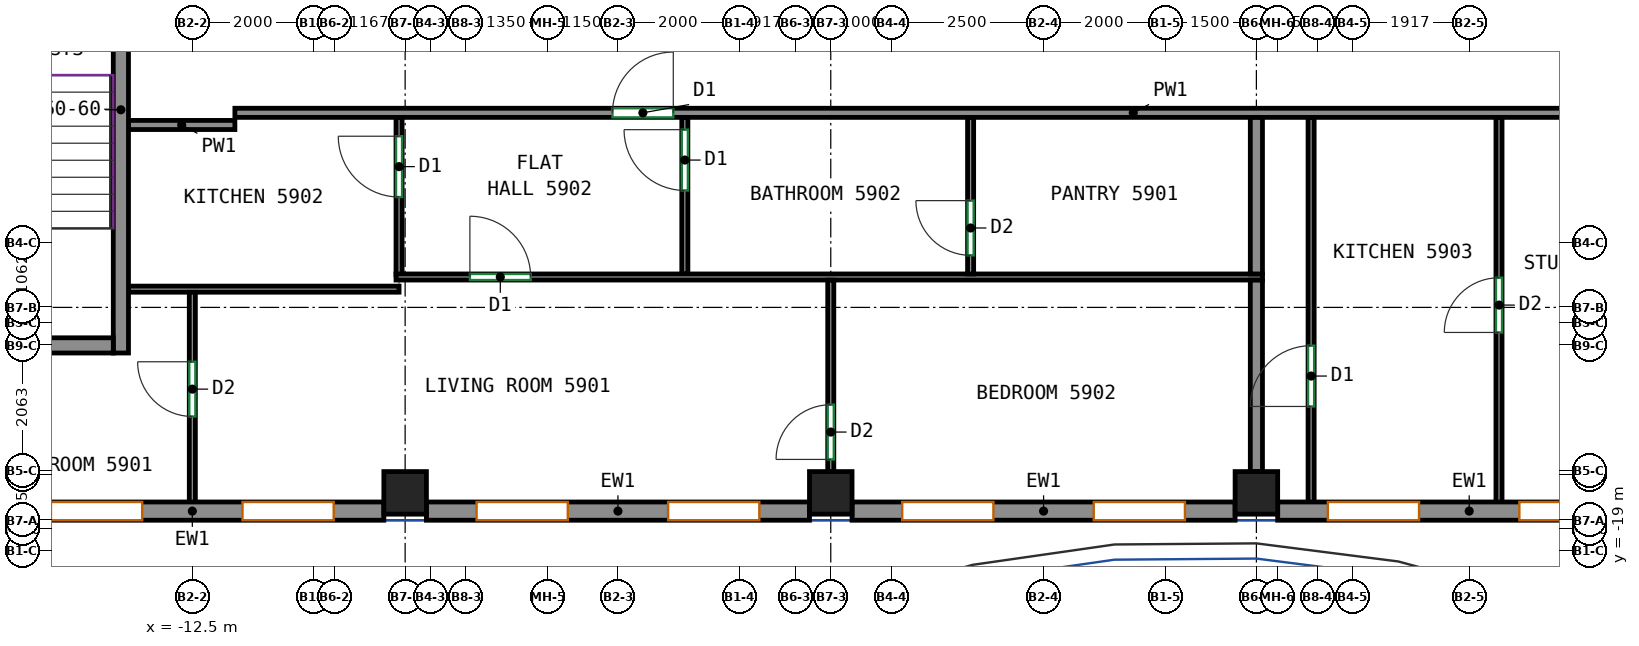
"""IFC4 building model, lengths in metres.
Left out: names, types, materials, properties, quantities, classifications, styles, units other than length and angle.
Written with IfcOpenShell. Run it as: python <this file> out.ifc"""

import sys

from ifc_helpers import new_model, si_unit, direction, frame, frame_2d, origin, origin_2d, place, context, subcontext, project, spatial, rectangle, extrude, source, transform, mapped, element, fill, save


model = new_model("IFC4")
c1 = context("Model", 3, precision=1e-05, world=origin(), true_north=direction((0.0, 1.0)))
c2 = subcontext(c1, "Body", "Model", "MODEL_VIEW")
j1 = project(units=[si_unit("LENGTHUNIT", "METRE"), si_unit("PLANEANGLEUNIT", "RADIAN")], contexts=[c1])
p1 = place(None, origin())
s1 = spatial("IfcSite", under=j1, at=p1, CompositionType="ELEMENT")
p2 = place(p1, origin())
s2 = spatial("IfcBuilding", under=s1, at=p2, CompositionType="ELEMENT")
p3 = place(p2, frame((0.0, 0.0, 245.8)))
s3 = spatial("IfcBuildingStorey", under=s2, at=p3, CompositionType="ELEMENT", Elevation=245.8)
m1 = source(origin(), c2, "Body", "SweptSolid", [
    extrude(rectangle(XDim=0.7, YDim=0.7, at=origin_2d()), origin(), (0.0, 0.0, 1.0), 3.12),
])
for number, where, z_axis, x_axis in (
    (1, (-9.0, -18.05, 0.0), (0.0, 0.0, 1.0), (1.0, 0.0, 0.0)),
    (2, (-2.0, -18.05, 0.0), (0.0, 0.0, 1.0), (1.0, 0.0, 0.0)),
    (3, (5.0, -18.05, 0.0), (0.0, 0.0, 1.0), (1.0, 0.0, 0.0)),
):
    element("IfcColumn", number, at=place(p3, frame(where, z_axis=z_axis, x_axis=x_axis)), inside=s3, PredefinedType="COLUMN", context=c2, shape_type="MappedRepresentation", body=[
        mapped(m1, transform((0.0, 0.0, 0.0))),
    ])
m2 = source(origin(), c2, "Body", "SweptSolid", [
    extrude(rectangle(XDim=8.0, YDim=0.25, at=frame_2d((4.0, 0.0))), origin(), (0.0, 0.0, 1.0), 3.12),
])
p4 = place(p3, frame((-13.675, -15.75, 0.0), z_axis=(0.0, 0.0, 1.0), x_axis=(0.0, 1.0, 0.0)))
e4 = element("IfcWall", 4, at=p4, inside=s3, PredefinedType="SHEAR", context=c2, shape_type="MappedRepresentation", body=[
    mapped(m2, transform((0.0, 0.0, 0.0))),
])
m3 = source(origin(), c2, "Body", "SweptSolid", [
    extrude(rectangle(XDim=3.7, YDim=0.25, at=frame_2d((1.85, 0.0))), origin(), (0.0, 0.0, 1.0), 3.12),
])
p5 = place(p3, frame((-17.5, -15.625, 0.0), z_axis=(0.0, 0.0, 1.0), x_axis=(1.0, 0.0, 0.0)))
e5 = element("IfcWall", 5, at=p5, inside=s3, PredefinedType="SHEAR", context=c2, shape_type="MappedRepresentation", body=[
    mapped(m3, transform((0.0, 0.0, 0.0))),
])
p6 = place(p5, frame((1.25, 0.0, 0.0)))
e6 = element("IfcOpeningElement", 6, at=p6, cuts=e5, PredefinedType="OPENING", context=c2, shape_type="SweptSolid", body=[
    extrude(rectangle(XDim=1.2, YDim=2.1, at=frame_2d((0.6, 1.05))), frame((0.0, 0.135, 0.0), z_axis=(0.0, -1.0, 0.0), x_axis=(1.0, 0.0, 0.0)), (0.0, 0.0, 1.0), 0.27),
])
m4 = source(origin(), c2, "Body", "SweptSolid", [
    extrude(rectangle(XDim=6.3, YDim=0.3, at=frame_2d((3.15, 0.0))), origin(), (0.0, 0.0, 1.0), 3.12),
])
p7 = place(p3, frame((-15.65, -18.35, 0.0), z_axis=(0.0, 0.0, 1.0), x_axis=(1.0, 0.0, 0.0)))
e7 = element("IfcWall", 7, at=p7, inside=s3, PredefinedType="SOLIDWALL", context=c2, shape_type="MappedRepresentation", body=[
    mapped(m4, transform((0.0, 0.0, 0.0))),
])
p8 = place(p7, frame((0.825, 0.0, 0.8)))
e8 = element("IfcOpeningElement", 8, at=p8, cuts=e7, PredefinedType="OPENING", context=c2, shape_type="SweptSolid", body=[
    extrude(rectangle(XDim=1.5, YDim=2.05, at=frame_2d((0.75, 1.025))), frame((0.0, 0.16, 0.0), z_axis=(0.0, -1.0, 0.0), x_axis=(1.0, 0.0, 0.0)), (0.0, 0.0, 1.0), 0.32),
])
p9 = place(p7, frame((3.975, 0.0, 0.8)))
e9 = element("IfcOpeningElement", 9, at=p9, cuts=e7, PredefinedType="OPENING", context=c2, shape_type="SweptSolid", body=[
    extrude(rectangle(XDim=1.5, YDim=2.05, at=frame_2d((0.75, 1.025))), frame((0.0, 0.16, 0.0), z_axis=(0.0, -1.0, 0.0), x_axis=(1.0, 0.0, 0.0)), (0.0, 0.0, 1.0), 0.32),
])
p10 = place(p3, frame((-8.65, -18.35, 0.0), z_axis=(0.0, 0.0, 1.0), x_axis=(1.0, 0.0, 0.0)))
e10 = element("IfcWall", 10, at=p10, inside=s3, PredefinedType="SOLIDWALL", context=c2, shape_type="MappedRepresentation", body=[
    mapped(m4, transform((0.0, 0.0, 0.0))),
])
p11 = place(p10, frame((0.825, 0.0, 0.8)))
e11 = element("IfcOpeningElement", 11, at=p11, cuts=e10, PredefinedType="OPENING", context=c2, shape_type="SweptSolid", body=[
    extrude(rectangle(XDim=1.5, YDim=2.05, at=frame_2d((0.75, 1.025))), frame((0.0, 0.16, 0.0), z_axis=(0.0, -1.0, 0.0), x_axis=(1.0, 0.0, 0.0)), (0.0, 0.0, 1.0), 0.32),
])
p12 = place(p10, frame((3.975, 0.0, 0.8)))
e12 = element("IfcOpeningElement", 12, at=p12, cuts=e10, PredefinedType="OPENING", context=c2, shape_type="SweptSolid", body=[
    extrude(rectangle(XDim=1.5, YDim=2.05, at=frame_2d((0.75, 1.025))), frame((0.0, 0.16, 0.0), z_axis=(0.0, -1.0, 0.0), x_axis=(1.0, 0.0, 0.0)), (0.0, 0.0, 1.0), 0.32),
])
p13 = place(p3, frame((-1.65, -18.35, 0.0), z_axis=(0.0, 0.0, 1.0), x_axis=(1.0, 0.0, 0.0)))
e13 = element("IfcWall", 13, at=p13, inside=s3, PredefinedType="SOLIDWALL", context=c2, shape_type="MappedRepresentation", body=[
    mapped(m4, transform((0.0, 0.0, 0.0))),
])
p14 = place(p13, frame((0.825, 0.0, 0.8)))
e14 = element("IfcOpeningElement", 14, at=p14, cuts=e13, PredefinedType="OPENING", context=c2, shape_type="SweptSolid", body=[
    extrude(rectangle(XDim=1.5, YDim=2.05, at=frame_2d((0.75, 1.025))), frame((0.0, 0.16, 0.0), z_axis=(0.0, -1.0, 0.0), x_axis=(1.0, 0.0, 0.0)), (0.0, 0.0, 1.0), 0.32),
])
p15 = place(p13, frame((3.975, 0.0, 0.8)))
e15 = element("IfcOpeningElement", 15, at=p15, cuts=e13, PredefinedType="OPENING", context=c2, shape_type="SweptSolid", body=[
    extrude(rectangle(XDim=1.5, YDim=2.05, at=frame_2d((0.75, 1.025))), frame((0.0, 0.16, 0.0), z_axis=(0.0, -1.0, 0.0), x_axis=(1.0, 0.0, 0.0)), (0.0, 0.0, 1.0), 0.32),
])
p16 = place(p3, frame((5.35, -18.35, 0.0), z_axis=(0.0, 0.0, 1.0), x_axis=(1.0, 0.0, 0.0)))
e16 = element("IfcWall", 16, at=p16, inside=s3, PredefinedType="SOLIDWALL", context=c2, shape_type="MappedRepresentation", body=[
    mapped(m4, transform((0.0, 0.0, 0.0))),
])
p17 = place(p16, frame((0.825, 0.0, 0.8)))
e17 = element("IfcOpeningElement", 17, at=p17, cuts=e16, PredefinedType="OPENING", context=c2, shape_type="SweptSolid", body=[
    extrude(rectangle(XDim=1.5, YDim=2.05, at=frame_2d((0.75, 1.025))), frame((0.0, 0.16, 0.0), z_axis=(0.0, -1.0, 0.0), x_axis=(1.0, 0.0, 0.0)), (0.0, 0.0, 1.0), 0.32),
])
p18 = place(p16, frame((3.975, 0.0, 0.8)))
e18 = element("IfcOpeningElement", 18, at=p18, cuts=e16, PredefinedType="OPENING", context=c2, shape_type="SweptSolid", body=[
    extrude(rectangle(XDim=1.5, YDim=2.05, at=frame_2d((0.75, 1.025))), frame((0.0, 0.16, 0.0), z_axis=(0.0, -1.0, 0.0), x_axis=(1.0, 0.0, 0.0)), (0.0, 0.0, 1.0), 0.32),
])
p19 = place(p3, frame((-11.8, -11.8, 0.0), z_axis=(0.0, 0.0, 1.0), x_axis=(1.0, 0.0, 0.0)))
e19 = element("IfcWall", 19, at=p19, inside=s3, PredefinedType="PARTITIONING", context=c2, shape_type="SweptSolid", body=[
    extrude(rectangle(XDim=29.55, YDim=0.15, at=frame_2d((14.775, 0.0))), origin(), (0.0, 0.0, 1.0), 3.12),
])
p20 = place(p19, frame((6.21, 0.0, 0.0)))
e20 = element("IfcOpeningElement", 20, at=p20, cuts=e19, PredefinedType="OPENING", context=c2, shape_type="SweptSolid", body=[
    extrude(rectangle(XDim=1.0, YDim=2.1, at=frame_2d((0.5, 1.05))), frame((0.0, 0.085, 0.0), z_axis=(0.0, -1.0, 0.0), x_axis=(1.0, 0.0, 0.0)), (0.0, 0.0, 1.0), 0.17),
])
p21 = place(p19, frame((23.111, 0.0, 0.0)))
e21 = element("IfcOpeningElement", 21, at=p21, cuts=e19, PredefinedType="OPENING", context=c2, shape_type="SweptSolid", body=[
    extrude(rectangle(XDim=1.0, YDim=2.1, at=frame_2d((0.5, 1.05))), frame((0.0, 0.085, 0.0), z_axis=(0.0, -1.0, 0.0), x_axis=(1.0, 0.0, 0.0)), (0.0, 0.0, 1.0), 0.17),
])
p22 = place(p3, frame((-13.55, -12.0, 0.0), z_axis=(0.0, 0.0, 1.0), x_axis=(1.0, 0.0, 0.0)))
e22 = element("IfcWall", 22, at=p22, inside=s3, PredefinedType="PARTITIONING", context=c2, shape_type="SweptSolid", body=[
    extrude(rectangle(XDim=1.75, YDim=0.15, at=frame_2d((0.875, 0.0))), origin(), (0.0, 0.0, 1.0), 3.12),
])
p23 = place(p3, frame((-9.1, -14.46, 0.0), z_axis=(0.0, 0.0, 1.0), x_axis=(0.0, 1.0, 0.0)))
e23 = element("IfcWall", 23, at=p23, inside=s3, PredefinedType="PARTITIONING", context=c2, shape_type="SweptSolid", body=[
    extrude(rectangle(XDim=2.583, YDim=0.1, at=frame_2d((1.292, 0.0))), origin(), (0.0, 0.0, 1.0), 3.12),
])
p24 = place(p23, frame((1.275, 0.0, 0.0)))
e24 = element("IfcOpeningElement", 24, at=p24, cuts=e23, PredefinedType="OPENING", context=c2, shape_type="SweptSolid", body=[
    extrude(rectangle(XDim=1.0, YDim=2.1, at=frame_2d((0.5, 1.05))), frame((0.0, 0.06, 0.0), z_axis=(0.0, -1.0, 0.0), x_axis=(1.0, 0.0, 0.0)), (0.0, 0.0, 1.0), 0.12),
])
p25 = place(p3, frame((-13.55, -14.7, 0.0), z_axis=(0.0, 0.0, 1.0), x_axis=(1.0, 0.0, 0.0)))
e25 = element("IfcWall", 25, at=p25, inside=s3, PredefinedType="PARTITIONING", context=c2, shape_type="SweptSolid", body=[
    extrude(rectangle(XDim=4.45, YDim=0.1, at=frame_2d((2.225, 0.0))), origin(), (0.0, 0.0, 1.0), 3.12),
])
p26 = place(p3, frame((-4.4, -14.45, 0.0), z_axis=(0.0, 0.0, 1.0), x_axis=(0.0, 1.0, 0.0)))
e26 = element("IfcWall", 26, at=p26, inside=s3, PredefinedType="PARTITIONING", context=c2, shape_type="SweptSolid", body=[
    extrude(rectangle(XDim=2.573, YDim=0.1, at=frame_2d((1.287, 0.0))), origin(), (0.0, 0.0, 1.0), 3.12),
])
p27 = place(p26, frame((1.373, 0.0, 0.0)))
e27 = element("IfcOpeningElement", 27, at=p27, cuts=e26, PredefinedType="OPENING", context=c2, shape_type="SweptSolid", body=[
    extrude(rectangle(XDim=1.0, YDim=2.1, at=frame_2d((0.5, 1.05))), frame((0.0, 0.06, 0.0), z_axis=(0.0, -1.0, 0.0), x_axis=(1.0, 0.0, 0.0)), (0.0, 0.0, 1.0), 0.12),
])
p28 = place(p3, frame((-9.15, -14.5, 0.0), z_axis=(0.0, 0.0, 1.0), x_axis=(1.0, 0.0, 0.0)))
e28 = element("IfcWall", 28, at=p28, inside=s3, PredefinedType="PARTITIONING", context=c2, shape_type="SweptSolid", body=[
    extrude(rectangle(XDim=14.25, YDim=0.1, at=frame_2d((7.125, 0.0))), origin(), (0.0, 0.0, 1.0), 3.12),
])
p29 = place(p28, frame((1.215, 0.0, 0.0)))
e29 = element("IfcOpeningElement", 29, at=p29, cuts=e28, PredefinedType="OPENING", context=c2, shape_type="SweptSolid", body=[
    extrude(rectangle(XDim=1.0, YDim=2.1, at=frame_2d((0.5, 1.05))), frame((0.0, 0.06, 0.0), z_axis=(0.0, -1.0, 0.0), x_axis=(1.0, 0.0, 0.0)), (0.0, 0.0, 1.0), 0.12),
])
p30 = place(p3, frame((0.3, -14.45, 0.0), z_axis=(0.0, 0.0, 1.0), x_axis=(0.0, 1.0, 0.0)))
e30 = element("IfcWall", 30, at=p30, inside=s3, PredefinedType="PARTITIONING", context=c2, shape_type="SweptSolid", body=[
    extrude(rectangle(XDim=2.573, YDim=0.1, at=frame_2d((1.287, 0.0))), origin(), (0.0, 0.0, 1.0), 3.12),
])
p31 = place(p30, frame((0.306, 0.0, 0.0)))
e31 = element("IfcOpeningElement", 31, at=p31, cuts=e30, PredefinedType="OPENING", context=c2, shape_type="SweptSolid", body=[
    extrude(rectangle(XDim=0.9, YDim=2.1, at=frame_2d((0.45, 1.05))), frame((0.0, 0.06, 0.0), z_axis=(0.0, -1.0, 0.0), x_axis=(1.0, 0.0, 0.0)), (0.0, 0.0, 1.0), 0.12),
])
p32 = place(p3, frame((5.0, -14.45, 0.0), z_axis=(0.0, 0.0, 1.0), x_axis=(0.0, 1.0, 0.0)))
e32 = element("IfcWall", 32, at=p32, inside=s3, PredefinedType="PARTITIONING", context=c2, shape_type="SweptSolid", body=[
    extrude(rectangle(XDim=2.573, YDim=0.2, at=frame_2d((1.287, 0.0))), origin(), (0.0, 0.0, 1.0), 3.12),
])
p33 = place(p3, frame((-12.5, -18.25, 0.0), z_axis=(0.0, 0.0, 1.0), x_axis=(0.0, 1.0, 0.0)))
e33 = element("IfcWall", 33, at=p33, inside=s3, PredefinedType="PARTITIONING", context=c2, shape_type="SweptSolid", body=[
    extrude(rectangle(XDim=3.498, YDim=0.1, at=frame_2d((1.749, 0.0))), origin(), (0.0, 0.0, 1.0), 3.12),
])
p34 = place(p33, frame((1.456, 0.0, 0.0)))
e34 = element("IfcOpeningElement", 34, at=p34, cuts=e33, PredefinedType="OPENING", context=c2, shape_type="SweptSolid", body=[
    extrude(rectangle(XDim=0.9, YDim=2.1, at=frame_2d((0.45, 1.05))), frame((0.0, 0.06, 0.0), z_axis=(0.0, -1.0, 0.0), x_axis=(1.0, 0.0, 0.0)), (0.0, 0.0, 1.0), 0.12),
])
p35 = place(p3, frame((-2.0, -17.7, 0.0), z_axis=(0.0, 0.0, 1.0), x_axis=(0.0, 1.0, 0.0)))
e35 = element("IfcWall", 35, at=p35, inside=s3, PredefinedType="PARTITIONING", context=c2, shape_type="SweptSolid", body=[
    extrude(rectangle(XDim=3.148, YDim=0.1, at=frame_2d((1.574, 0.0))), origin(), (0.0, 0.0, 1.0), 3.12),
])
p36 = place(p35, frame((0.2, 0.0, 0.0)))
e36 = element("IfcOpeningElement", 36, at=p36, cuts=e35, PredefinedType="OPENING", context=c2, shape_type="SweptSolid", body=[
    extrude(rectangle(XDim=0.9, YDim=2.1, at=frame_2d((0.45, 1.05))), frame((0.0, 0.06, 0.0), z_axis=(0.0, -1.0, 0.0), x_axis=(1.0, 0.0, 0.0)), (0.0, 0.0, 1.0), 0.12),
])
p37 = place(p3, frame((5.0, -17.7, 0.0), z_axis=(0.0, 0.0, 1.0), x_axis=(0.0, 1.0, 0.0)))
e37 = element("IfcWall", 37, at=p37, inside=s3, PredefinedType="PARTITIONING", context=c2, shape_type="SweptSolid", body=[
    extrude(rectangle(XDim=3.148, YDim=0.2, at=frame_2d((1.574, 0.0))), origin(), (0.0, 0.0, 1.0), 3.12),
])
p38 = place(p3, frame((5.9, -18.25, 0.0), z_axis=(0.0, 0.0, 1.0), x_axis=(0.0, 1.0, 0.0)))
e38 = element("IfcWall", 38, at=p38, inside=s3, PredefinedType="PARTITIONING", context=c2, shape_type="SweptSolid", body=[
    extrude(rectangle(XDim=6.373, YDim=0.1, at=frame_2d((3.187, 0.0))), origin(), (0.0, 0.0, 1.0), 3.12),
])
p39 = place(p38, frame((1.621, 0.0, 0.0)))
e39 = element("IfcOpeningElement", 39, at=p39, cuts=e38, PredefinedType="OPENING", context=c2, shape_type="SweptSolid", body=[
    extrude(rectangle(XDim=1.0, YDim=2.1, at=frame_2d((0.5, 1.05))), frame((0.0, 0.06, 0.0), z_axis=(0.0, -1.0, 0.0), x_axis=(1.0, 0.0, 0.0)), (0.0, 0.0, 1.0), 0.12),
])
p40 = place(p3, frame((8.99, -18.25, 0.0), z_axis=(0.0, 0.0, 1.0), x_axis=(0.0, 1.0, 0.0)))
e40 = element("IfcWall", 40, at=p40, inside=s3, PredefinedType="PARTITIONING", context=c2, shape_type="SweptSolid", body=[
    extrude(rectangle(XDim=6.373, YDim=0.1, at=frame_2d((3.187, 0.0))), origin(), (0.0, 0.0, 1.0), 3.12),
])
p41 = place(p40, frame((2.838, 0.0, 0.0)))
e41 = element("IfcOpeningElement", 41, at=p41, cuts=e40, PredefinedType="OPENING", context=c2, shape_type="SweptSolid", body=[
    extrude(rectangle(XDim=0.9, YDim=2.1, at=frame_2d((0.45, 1.05))), frame((0.0, 0.06, 0.0), z_axis=(0.0, -1.0, 0.0), x_axis=(1.0, 0.0, 0.0)), (0.0, 0.0, 1.0), 0.12),
])
p42 = place(p8, origin())
e42 = element("IfcWindow", 42, at=p42, inside=s3, PartitioningType="SINGLE_PANEL", PredefinedType="WINDOW", context=c2, shape_type="SweptSolid", body=[
    extrude(rectangle(XDim=1.5, YDim=2.05, at=frame_2d((0.75, 1.025))), frame((0.0, 0.03, 0.0), z_axis=(0.0, -1.0, 0.0), x_axis=(1.0, 0.0, 0.0)), (0.0, 0.0, 1.0), 0.06),
])
fill(e8, e42)
p43 = place(p9, origin())
e43 = element("IfcWindow", 43, at=p43, inside=s3, PartitioningType="SINGLE_PANEL", PredefinedType="WINDOW", context=c2, shape_type="SweptSolid", body=[
    extrude(rectangle(XDim=1.5, YDim=2.05, at=frame_2d((0.75, 1.025))), frame((0.0, 0.03, 0.0), z_axis=(0.0, -1.0, 0.0), x_axis=(1.0, 0.0, 0.0)), (0.0, 0.0, 1.0), 0.06),
])
fill(e9, e43)
p44 = place(p11, origin())
e44 = element("IfcWindow", 44, at=p44, inside=s3, PartitioningType="SINGLE_PANEL", PredefinedType="WINDOW", context=c2, shape_type="SweptSolid", body=[
    extrude(rectangle(XDim=1.5, YDim=2.05, at=frame_2d((0.75, 1.025))), frame((0.0, 0.03, 0.0), z_axis=(0.0, -1.0, 0.0), x_axis=(1.0, 0.0, 0.0)), (0.0, 0.0, 1.0), 0.06),
])
fill(e11, e44)
p45 = place(p12, origin())
e45 = element("IfcWindow", 45, at=p45, inside=s3, PartitioningType="SINGLE_PANEL", PredefinedType="WINDOW", context=c2, shape_type="SweptSolid", body=[
    extrude(rectangle(XDim=1.5, YDim=2.05, at=frame_2d((0.75, 1.025))), frame((0.0, 0.03, 0.0), z_axis=(0.0, -1.0, 0.0), x_axis=(1.0, 0.0, 0.0)), (0.0, 0.0, 1.0), 0.06),
])
fill(e12, e45)
p46 = place(p14, origin())
e46 = element("IfcWindow", 46, at=p46, inside=s3, PartitioningType="SINGLE_PANEL", PredefinedType="WINDOW", context=c2, shape_type="SweptSolid", body=[
    extrude(rectangle(XDim=1.5, YDim=2.05, at=frame_2d((0.75, 1.025))), frame((0.0, 0.03, 0.0), z_axis=(0.0, -1.0, 0.0), x_axis=(1.0, 0.0, 0.0)), (0.0, 0.0, 1.0), 0.06),
])
fill(e14, e46)
p47 = place(p15, origin())
e47 = element("IfcWindow", 47, at=p47, inside=s3, PartitioningType="SINGLE_PANEL", PredefinedType="WINDOW", context=c2, shape_type="SweptSolid", body=[
    extrude(rectangle(XDim=1.5, YDim=2.05, at=frame_2d((0.75, 1.025))), frame((0.0, 0.03, 0.0), z_axis=(0.0, -1.0, 0.0), x_axis=(1.0, 0.0, 0.0)), (0.0, 0.0, 1.0), 0.06),
])
fill(e15, e47)
p48 = place(p17, origin())
e48 = element("IfcWindow", 48, at=p48, inside=s3, PartitioningType="SINGLE_PANEL", PredefinedType="WINDOW", context=c2, shape_type="SweptSolid", body=[
    extrude(rectangle(XDim=1.5, YDim=2.05, at=frame_2d((0.75, 1.025))), frame((0.0, 0.03, 0.0), z_axis=(0.0, -1.0, 0.0), x_axis=(1.0, 0.0, 0.0)), (0.0, 0.0, 1.0), 0.06),
])
fill(e17, e48)
p49 = place(p18, origin())
e49 = element("IfcWindow", 49, at=p49, inside=s3, PartitioningType="SINGLE_PANEL", PredefinedType="WINDOW", context=c2, shape_type="SweptSolid", body=[
    extrude(rectangle(XDim=1.5, YDim=2.05, at=frame_2d((0.75, 1.025))), frame((0.0, 0.03, 0.0), z_axis=(0.0, -1.0, 0.0), x_axis=(1.0, 0.0, 0.0)), (0.0, 0.0, 1.0), 0.06),
])
fill(e18, e49)
p50 = place(p36, origin())
e50 = element("IfcDoor", 50, at=p50, inside=s3, OperationType="SINGLE_SWING_LEFT", PredefinedType="DOOR", context=c2, shape_type="SweptSolid", body=[
    extrude(rectangle(XDim=0.9, YDim=2.1, at=frame_2d((0.45, 1.05))), frame((0.0, 0.025, 0.0), z_axis=(0.0, -1.0, 0.0), x_axis=(1.0, 0.0, 0.0)), (0.0, 0.0, 1.0), 0.05),
])
fill(e36, e50)
p51 = place(p34, origin())
e51 = element("IfcDoor", 51, at=p51, inside=s3, OperationType="SINGLE_SWING_RIGHT", PredefinedType="DOOR", context=c2, shape_type="SweptSolid", body=[
    extrude(rectangle(XDim=0.9, YDim=2.1, at=frame_2d((0.45, 1.05))), frame((0.0, 0.025, 0.0), z_axis=(0.0, -1.0, 0.0), x_axis=(1.0, 0.0, 0.0)), (0.0, 0.0, 1.0), 0.05),
])
fill(e34, e51)
p52 = place(p39, origin())
e52 = element("IfcDoor", 52, at=p52, inside=s3, OperationType="SINGLE_SWING_LEFT", PredefinedType="DOOR", context=c2, shape_type="SweptSolid", body=[
    extrude(rectangle(XDim=1.0, YDim=2.1, at=frame_2d((0.5, 1.05))), frame((0.0, 0.025, 0.0), z_axis=(0.0, -1.0, 0.0), x_axis=(1.0, 0.0, 0.0)), (0.0, 0.0, 1.0), 0.05),
])
fill(e39, e52)
p53 = place(p41, origin())
e53 = element("IfcDoor", 53, at=p53, inside=s3, OperationType="SINGLE_SWING_LEFT", PredefinedType="DOOR", context=c2, shape_type="SweptSolid", body=[
    extrude(rectangle(XDim=0.9, YDim=2.1, at=frame_2d((0.45, 1.05))), frame((0.0, 0.025, 0.0), z_axis=(0.0, -1.0, 0.0), x_axis=(1.0, 0.0, 0.0)), (0.0, 0.0, 1.0), 0.05),
])
fill(e41, e53)
p54 = place(p29, origin())
e54 = element("IfcDoor", 54, at=p54, inside=s3, OperationType="SINGLE_SWING_LEFT", PredefinedType="DOOR", context=c2, shape_type="SweptSolid", body=[
    extrude(rectangle(XDim=1.0, YDim=2.1, at=frame_2d((0.5, 1.05))), frame((0.0, 0.025, 0.0), z_axis=(0.0, -1.0, 0.0), x_axis=(1.0, 0.0, 0.0)), (0.0, 0.0, 1.0), 0.05),
])
fill(e29, e54)
p55 = place(p31, origin())
e55 = element("IfcDoor", 55, at=p55, inside=s3, OperationType="SINGLE_SWING_RIGHT", PredefinedType="DOOR", context=c2, shape_type="SweptSolid", body=[
    extrude(rectangle(XDim=0.9, YDim=2.1, at=frame_2d((0.45, 1.05))), frame((0.0, 0.025, 0.0), z_axis=(0.0, -1.0, 0.0), x_axis=(1.0, 0.0, 0.0)), (0.0, 0.0, 1.0), 0.05),
])
fill(e31, e55)
p56 = place(p24, origin())
e56 = element("IfcDoor", 56, at=p56, inside=s3, OperationType="SINGLE_SWING_RIGHT", PredefinedType="DOOR", context=c2, shape_type="SweptSolid", body=[
    extrude(rectangle(XDim=1.0, YDim=2.1, at=frame_2d((0.5, 1.05))), frame((0.0, 0.025, 0.0), z_axis=(0.0, -1.0, 0.0), x_axis=(1.0, 0.0, 0.0)), (0.0, 0.0, 1.0), 0.05),
])
fill(e24, e56)
p57 = place(p27, origin())
e57 = element("IfcDoor", 57, at=p57, inside=s3, OperationType="SINGLE_SWING_RIGHT", PredefinedType="DOOR", context=c2, shape_type="SweptSolid", body=[
    extrude(rectangle(XDim=1.0, YDim=2.1, at=frame_2d((0.5, 1.05))), frame((0.0, 0.025, 0.0), z_axis=(0.0, -1.0, 0.0), x_axis=(1.0, 0.0, 0.0)), (0.0, 0.0, 1.0), 0.05),
])
fill(e27, e57)
p58 = place(p20, origin())
e58 = element("IfcDoor", 58, at=p58, inside=s3, OperationType="SINGLE_SWING_RIGHT", PredefinedType="DOOR", context=c2, shape_type="SweptSolid", body=[
    extrude(rectangle(XDim=1.0, YDim=2.1, at=frame_2d((0.5, 1.05))), frame((0.0, 0.025, 0.0), z_axis=(0.0, -1.0, 0.0), x_axis=(1.0, 0.0, 0.0)), (0.0, 0.0, 1.0), 0.05),
])
fill(e20, e58)
save(model, sys.argv[1])
